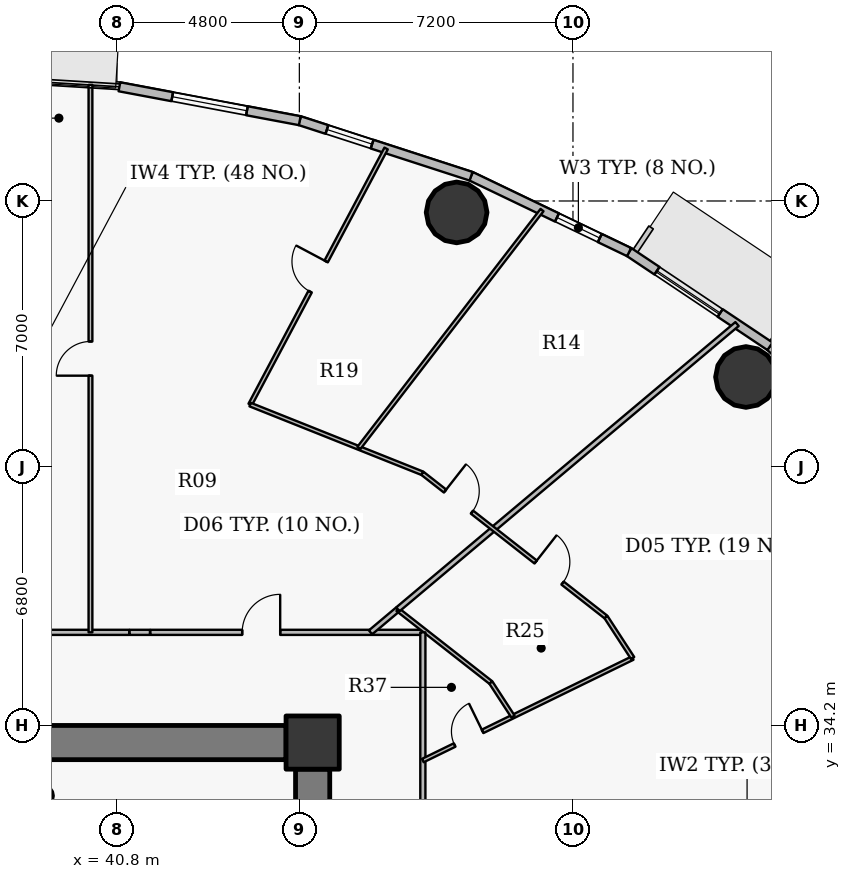
"""IFC4 building model, lengths in metres.
Left out: names, types, materials, properties, quantities, classifications, styles, units other than length and angle.
Written with IfcOpenShell. Run it as: python <this file> out.ifc"""

import sys

from ifc_helpers import new_model, si_unit, direction, frame, frame_2d, origin, origin_2d, place, context, subcontext, project, spatial, rectangle, hollow_circle, extrude, source, transform, mapped, element, fill, save


model = new_model("IFC4")
c1 = context("Model", 3, precision=1e-05, world=origin(), true_north=direction((0.0, 1.0)))
c2 = subcontext(c1, "Body", "Model", "MODEL_VIEW")
j1 = project(units=[si_unit("LENGTHUNIT", "METRE"), si_unit("PLANEANGLEUNIT", "RADIAN")], contexts=[c1])
p1 = place(None, origin())
s1 = spatial("IfcSite", under=j1, at=p1, CompositionType="ELEMENT")
p2 = place(p1, origin())
s2 = spatial("IfcBuilding", under=s1, at=p2, CompositionType="ELEMENT")
p3 = place(p2, frame((0.0, 0.0, 61.8)))
s3 = spatial("IfcBuildingStorey", under=s2, at=p3, CompositionType="ELEMENT", Elevation=61.8)
p4 = place(p3, frame((45.95, 33.75, 0.0), z_axis=(0.0, 0.0, 1.0), x_axis=(1.0, 0.0, 0.0)))
e1 = element("IfcColumn", 1, at=p4, inside=s3, PredefinedType="COLUMN", context=c2, shape_type="SweptSolid", body=[
    extrude(rectangle(XDim=1.4, YDim=1.4, at=origin_2d()), origin(), (0.0, 0.0, 1.0), 4.2),
])
p5 = place(p3, frame((38.85, 32.35, 0.0), z_axis=(0.0, 0.0, 1.0), x_axis=(1.0, 0.0, 0.0)))
e2 = element("IfcColumn", 2, at=p5, inside=s3, PredefinedType="COLUMN", context=c2, shape_type="SweptSolid", body=[
    extrude(hollow_circle(Radius=0.254, WallThickness=0.02, at=origin_2d()), origin(), (0.0, 0.0, 1.0), 4.2),
])
p6 = place(p3, frame((26.75, 33.75, 0.0), z_axis=(0.0, 0.0, 1.0), x_axis=(1.0, 0.0, 0.0)))
e3 = element("IfcWall", 3, at=p6, inside=s3, PredefinedType="SHEAR", context=c2, shape_type="SweptSolid", body=[
    extrude(rectangle(XDim=18.5, YDim=0.9, at=frame_2d((9.25, 0.0))), origin(), (0.0, 0.0, 1.0), 3.4),
])
p7 = place(p3, frame((45.95, 33.05, 0.0), z_axis=(0.0, 0.0, 1.0), x_axis=(0.0, -1.0, 0.0)))
e4 = element("IfcWall", 4, at=p7, inside=s3, PredefinedType="SHEAR", context=c2, shape_type="SweptSolid", body=[
    extrude(rectangle(XDim=12.1, YDim=0.9, at=frame_2d((6.05, 0.0))), origin(), (0.0, 0.0, 1.0), 3.4),
])
p8 = place(p7, frame((5.64, 0.0, 0.0)))
e5 = element("IfcOpeningElement", 5, at=p8, cuts=e4, PredefinedType="OPENING", context=c2, shape_type="SweptSolid", body=[
    extrude(rectangle(XDim=0.82, YDim=2.1, at=origin_2d()), frame((0.41, 0.46, 1.05), z_axis=(0.0, -1.0, 0.0), x_axis=(1.0, 0.0, 0.0)), (0.0, 0.0, 1.0), 0.92),
])
for number, where, z_axis, x_axis in (
    (6, (57.353, 43.369, 0.0), (0.0, 0.0, 1.0), (1.0, 0.0, 0.0)),
    (7, (49.738, 47.699, 0.0), (0.0, 0.0, 1.0), (1.0, 0.0, 0.0)),
):
    element("IfcColumn", number, at=place(p3, frame(where, z_axis=z_axis, x_axis=x_axis)), inside=s3, PredefinedType="COLUMN", context=c2, shape_type="SweptSolid", body=[
        extrude(hollow_circle(Radius=0.8, WallThickness=0.045, at=origin_2d()), origin(), (0.0, 0.0, 1.0), 4.2),
    ])
p9 = place(p3, frame((57.985, 44.176, 0.0), z_axis=(0.0, 0.0, 1.0), x_axis=(0.737116376281, -0.67576582321, 0.0)))
e8 = element("IfcWall", 8, at=p9, inside=s3, PredefinedType="SOLIDWALL", context=c2, shape_type="SweptSolid", body=[
    extrude(rectangle(XDim=4.294, YDim=0.24, at=frame_2d((2.147, 0.0))), origin(), (0.0, 0.0, 1.0), 3.95),
])
p10 = place(p9, frame((1.147, 0.0, 0.9)))
e9 = element("IfcOpeningElement", 9, at=p10, cuts=e8, PredefinedType="OPENING", context=c2, shape_type="SweptSolid", body=[
    extrude(rectangle(XDim=2.0, YDim=1.75, at=origin_2d()), frame((1.0, 0.13, 0.875), z_axis=(0.0, -1.0, 0.0), x_axis=(1.0, 0.0, 0.0)), (0.0, 0.0, 1.0), 0.26),
])
p11 = place(p3, frame((54.277, 46.656, 0.0), z_axis=(0.0, 0.0, 1.0), x_axis=(0.831240982525, -0.555912249343, 0.0)))
e10 = element("IfcWall", 10, at=p11, inside=s3, PredefinedType="SOLIDWALL", context=c2, shape_type="SweptSolid", body=[
    extrude(rectangle(XDim=4.46, YDim=0.24, at=frame_2d((2.23, 0.0))), origin(), (0.0, 0.0, 1.0), 3.95),
])
p12 = place(p11, frame((0.883, 0.0, 0.9)))
e11 = element("IfcOpeningElement", 11, at=p12, cuts=e10, PredefinedType="OPENING", context=c2, shape_type="SweptSolid", body=[
    extrude(rectangle(XDim=2.0, YDim=1.75, at=origin_2d()), frame((1.0, 0.13, 0.875), z_axis=(0.0, -1.0, 0.0), x_axis=(1.0, 0.0, 0.0)), (0.0, 0.0, 1.0), 0.26),
])
p13 = place(p3, frame((50.118, 48.651, 0.0), z_axis=(0.0, 0.0, 1.0), x_axis=(0.901601503137, -0.432567601123, 0.0)))
e12 = element("IfcWall", 12, at=p13, inside=s3, PredefinedType="SOLIDWALL", context=c2, shape_type="SweptSolid", body=[
    extrude(rectangle(XDim=4.613, YDim=0.24, at=frame_2d((2.306, 0.0))), origin(), (0.0, 0.0, 1.0), 3.95),
])
p14 = place(p13, frame((2.508, 0.0, 0.9)))
e13 = element("IfcOpeningElement", 13, at=p14, cuts=e12, PredefinedType="OPENING", context=c2, shape_type="SweptSolid", body=[
    extrude(rectangle(XDim=1.25, YDim=1.65, at=origin_2d()), frame((0.625, 0.13, 0.825), z_axis=(0.0, -1.0, 0.0), x_axis=(1.0, 0.0, 0.0)), (0.0, 0.0, 1.0), 0.26),
])
p15 = place(p3, frame((45.611, 50.113, 0.0), z_axis=(0.0, 0.0, 1.0), x_axis=(0.951207699013, -0.308551313946, 0.0)))
e14 = element("IfcWall", 14, at=p15, inside=s3, PredefinedType="SOLIDWALL", context=c2, shape_type="SweptSolid", body=[
    extrude(rectangle(XDim=4.739, YDim=0.24, at=frame_2d((2.369, 0.0))), origin(), (0.0, 0.0, 1.0), 3.95),
])
p16 = place(p15, frame((0.751, 0.0, 0.9)))
e15 = element("IfcOpeningElement", 15, at=p16, cuts=e14, PredefinedType="OPENING", context=c2, shape_type="SweptSolid", body=[
    extrude(rectangle(XDim=1.25, YDim=1.65, at=origin_2d()), frame((0.625, 0.13, 0.825), z_axis=(0.0, -1.0, 0.0), x_axis=(1.0, 0.0, 0.0)), (0.0, 0.0, 1.0), 0.26),
])
p17 = place(p3, frame((40.865, 51.005, 0.0), z_axis=(0.0, 0.0, 1.0), x_axis=(0.982791952378, -0.184715939598, 0.0)))
e16 = element("IfcWall", 16, at=p17, inside=s3, PredefinedType="SOLIDWALL", context=c2, shape_type="SweptSolid", body=[
    extrude(rectangle(XDim=4.828, YDim=0.24, at=frame_2d((2.414, 0.0))), origin(), (0.0, 0.0, 1.0), 3.95),
])
p18 = place(p17, frame((1.414, 0.0, 0.9)))
e17 = element("IfcOpeningElement", 17, at=p18, cuts=e16, PredefinedType="OPENING", context=c2, shape_type="SweptSolid", body=[
    extrude(rectangle(XDim=2.0, YDim=1.75, at=origin_2d()), frame((1.0, 0.13, 0.875), z_axis=(0.0, -1.0, 0.0), x_axis=(1.0, 0.0, 0.0)), (0.0, 0.0, 1.0), 0.26),
])
p19 = place(p3, frame((32.088, 36.65, 0.0), z_axis=(0.0, 0.0, 1.0), x_axis=(1.0, 0.0, 0.0)))
e18 = element("IfcWall", 18, at=p19, inside=s3, PredefinedType="PARTITIONING", context=c2, shape_type="SweptSolid", body=[
    extrude(rectangle(XDim=9.036, YDim=0.135, at=frame_2d((4.518, 0.0))), origin(), (0.0, 0.0, 1.0), 3.285),
])
p20 = place(p19, frame((3.238, 0.0, 0.0)))
e19 = element("IfcOpeningElement", 19, at=p20, cuts=e18, PredefinedType="OPENING", context=c2, shape_type="SweptSolid", body=[
    extrude(rectangle(XDim=1.0, YDim=2.15, at=origin_2d()), frame((0.5, 0.078, 1.075), z_axis=(0.0, -1.0, 0.0), x_axis=(1.0, 0.0, 0.0)), (0.0, 0.0, 1.0), 0.155),
])
p21 = place(p3, frame((40.104, 36.65, 0.0), z_axis=(0.0, 0.0, 1.0), x_axis=(0.0, 1.0, 0.0)))
e20 = element("IfcWall", 20, at=p21, inside=s3, PredefinedType="PARTITIONING", context=c2, shape_type="SweptSolid", body=[
    extrude(rectangle(XDim=14.407, YDim=0.1, at=frame_2d((7.204, 0.0))), origin(), (0.0, 0.0, 1.0), 3.335),
])
p22 = place(p21, frame((6.754, 0.0, 0.0)))
e21 = element("IfcOpeningElement", 21, at=p22, cuts=e20, PredefinedType="OPENING", context=c2, shape_type="SweptSolid", body=[
    extrude(rectangle(XDim=0.9, YDim=2.1, at=origin_2d()), frame((0.45, 0.06, 1.05), z_axis=(0.0, -1.0, 0.0), x_axis=(1.0, 0.0, 0.0)), (0.0, 0.0, 1.0), 0.12),
])
p23 = place(p3, frame((41.679, 36.65, 0.0), z_axis=(0.0, 0.0, 1.0), x_axis=(1.0, 0.0, 0.0)))
e22 = element("IfcWall", 22, at=p23, inside=s3, PredefinedType="PARTITIONING", context=c2, shape_type="SweptSolid", body=[
    extrude(rectangle(XDim=7.171, YDim=0.135, at=frame_2d((3.586, 0.0))), origin(), (0.0, 0.0, 1.0), 3.285),
])
p24 = place(p23, frame((2.417, 0.0, 0.0)))
e23 = element("IfcOpeningElement", 23, at=p24, cuts=e22, PredefinedType="OPENING", context=c2, shape_type="SweptSolid", body=[
    extrude(rectangle(XDim=1.0, YDim=2.15, at=origin_2d()), frame((0.5, 0.078, 1.075), z_axis=(0.0, -1.0, 0.0), x_axis=(1.0, 0.0, 0.0)), (0.0, 0.0, 1.0), 0.155),
])
p25 = place(p3, frame((44.306, 42.643, 0.0), z_axis=(0.0, 0.0, 1.0), x_axis=(0.468943074609, 0.883228392193, 0.0)))
e24 = element("IfcWall", 24, at=p25, inside=s3, PredefinedType="PARTITIONING", context=c2, shape_type="SweptSolid", body=[
    extrude(rectangle(XDim=7.629, YDim=0.1, at=frame_2d((3.814, 0.0))), origin(), (0.0, 0.0, 1.0), 3.335),
])
p26 = place(p25, frame((3.365, 0.0, 0.0)))
e25 = element("IfcOpeningElement", 25, at=p26, cuts=e24, PredefinedType="OPENING", context=c2, shape_type="SweptSolid", body=[
    extrude(rectangle(XDim=0.9, YDim=2.1, at=origin_2d()), frame((0.45, 0.06, 1.05), z_axis=(0.0, -1.0, 0.0), x_axis=(1.0, 0.0, 0.0)), (0.0, 0.0, 1.0), 0.12),
])
p27 = place(p3, frame((44.306, 42.643, 0.0), z_axis=(0.0, 0.0, 1.0), x_axis=(0.928800719386, -0.37057957805, 0.0)))
e26 = element("IfcWall", 26, at=p27, inside=s3, PredefinedType="PARTITIONING", context=c2, shape_type="SweptSolid", body=[
    extrude(rectangle(XDim=4.879, YDim=0.1, at=frame_2d((2.439, 0.0))), origin(), (0.0, 0.0, 1.0), 3.285),
])
p28 = place(p3, frame((47.166, 41.502, 0.0), z_axis=(0.0, 0.0, 1.0), x_axis=(0.610084092609, 0.792336670832, 0.0)))
e27 = element("IfcWall", 27, at=p28, inside=s3, PredefinedType="PARTITIONING", context=c2, shape_type="SweptSolid", body=[
    extrude(rectangle(XDim=7.899, YDim=0.1, at=frame_2d((3.95, 0.0))), origin(), (0.0, 0.0, 1.0), 3.335),
])
p29 = place(p3, frame((47.473, 36.65, 0.0), z_axis=(0.0, 0.0, 1.0), x_axis=(0.765142102307, 0.643861447268, 0.0)))
e28 = element("IfcWall", 28, at=p29, inside=s3, PredefinedType="PARTITIONING", context=c2, shape_type="SweptSolid", body=[
    extrude(rectangle(XDim=0.932, YDim=0.135, at=frame_2d((0.466, 0.0))), origin(), (0.0, 0.0, 1.0), 3.95),
])
p30 = place(p3, frame((48.186, 37.25, 0.0), z_axis=(0.0, 0.0, 1.0), x_axis=(0.787352897258, -0.61650256705, 0.0)))
e29 = element("IfcWall", 29, at=p30, inside=s3, PredefinedType="PARTITIONING", context=c2, shape_type="SweptSolid", body=[
    extrude(rectangle(XDim=3.117, YDim=0.1, at=frame_2d((1.558, 0.0))), origin(), (0.0, 0.0, 1.0), 3.285),
])
p31 = place(p3, frame((48.194, 37.256, 0.0), z_axis=(0.0, 0.0, 1.0), x_axis=(0.76528027527, 0.643697211647, 0.0)))
e30 = element("IfcWall", 30, at=p31, inside=s3, PredefinedType="PARTITIONING", context=c2, shape_type="SweptSolid", body=[
    extrude(rectangle(XDim=11.661, YDim=0.135, at=frame_2d((5.83, 0.0))), origin(), (0.0, 0.0, 1.0), 3.335),
])
p32 = place(p3, frame((48.837, 40.835, 0.0), z_axis=(0.0, 0.0, 1.0), x_axis=(0.787362261728, -0.616490607233, 0.0)))
e31 = element("IfcWall", 31, at=p32, inside=s3, PredefinedType="PARTITIONING", context=c2, shape_type="SweptSolid", body=[
    extrude(rectangle(XDim=6.137, YDim=0.1, at=frame_2d((3.068, 0.0))), origin(), (0.0, 0.0, 1.0), 3.285),
])
p33 = place(p32, frame((3.786, 0.0, 0.0)))
e32 = element("IfcOpeningElement", 32, at=p33, cuts=e31, PredefinedType="OPENING", context=c2, shape_type="SweptSolid", body=[
    extrude(rectangle(XDim=0.9, YDim=2.1, at=origin_2d()), frame((0.45, 0.06, 1.05), z_axis=(0.0, -1.0, 0.0), x_axis=(1.0, 0.0, 0.0)), (0.0, 0.0, 1.0), 0.12),
])
p34 = place(p32, frame((0.758, 0.0, 0.0)))
e33 = element("IfcOpeningElement", 33, at=p34, cuts=e31, PredefinedType="OPENING", context=c2, shape_type="SweptSolid", body=[
    extrude(rectangle(XDim=0.9, YDim=2.1, at=origin_2d()), frame((0.45, 0.06, 1.05), z_axis=(0.0, -1.0, 0.0), x_axis=(1.0, 0.0, 0.0)), (0.0, 0.0, 1.0), 0.12),
])
p35 = place(p3, frame((48.85, 24.742, 0.0), z_axis=(0.0, 0.0, 1.0), x_axis=(0.0, 1.0, 0.0)))
e34 = element("IfcWall", 34, at=p35, inside=s3, PredefinedType="PARTITIONING", context=c2, shape_type="SweptSolid", body=[
    extrude(rectangle(XDim=11.908, YDim=0.135, at=frame_2d((5.954, 0.0))), origin(), (0.0, 0.0, 1.0), 3.285),
])
p36 = place(p35, frame((6.262, 0.0, 0.0)))
e35 = element("IfcOpeningElement", 35, at=p36, cuts=e34, PredefinedType="OPENING", context=c2, shape_type="SweptSolid", body=[
    extrude(rectangle(XDim=1.0, YDim=2.15, at=origin_2d()), frame((0.5, 0.078, 1.075), z_axis=(0.0, -1.0, 0.0), x_axis=(1.0, 0.0, 0.0)), (0.0, 0.0, 1.0), 0.155),
])
p37 = place(p35, frame((2.015, 0.0, 0.0)))
e36 = element("IfcOpeningElement", 36, at=p37, cuts=e34, PredefinedType="OPENING", context=c2, shape_type="SweptSolid", body=[
    extrude(rectangle(XDim=1.0, YDim=2.15, at=origin_2d()), frame((0.5, 0.078, 1.075), z_axis=(0.0, -1.0, 0.0), x_axis=(1.0, 0.0, 0.0)), (0.0, 0.0, 1.0), 0.155),
])
p38 = place(p3, frame((48.85, 29.731, 0.0), z_axis=(0.0, 0.0, 1.0), x_axis=(0.97814985104, 0.207901103679, 0.0)))
e37 = element("IfcWall", 37, at=p38, inside=s3, PredefinedType="PARTITIONING", context=c2, shape_type="SweptSolid", body=[
    extrude(rectangle(XDim=17.444, YDim=0.135, at=frame_2d((8.722, 0.0))), origin(), (0.0, 0.0, 1.0), 3.335),
])
p39 = place(p3, frame((48.85, 33.277, 0.0), z_axis=(0.0, 0.0, 1.0), x_axis=(0.898537268474, 0.438897228476, 0.0)))
e38 = element("IfcWall", 38, at=p39, inside=s3, PredefinedType="PARTITIONING", context=c2, shape_type="SweptSolid", body=[
    extrude(rectangle(XDim=6.144, YDim=0.1, at=frame_2d((3.072, 0.0))), origin(), (0.0, 0.0, 1.0), 3.95),
])
p40 = place(p39, frame((0.93, 0.0, 0.0)))
e39 = element("IfcOpeningElement", 39, at=p40, cuts=e38, PredefinedType="OPENING", context=c2, shape_type="SweptSolid", body=[
    extrude(rectangle(XDim=0.82, YDim=2.1, at=origin_2d()), frame((0.41, 0.06, 1.05), z_axis=(0.0, -1.0, 0.0), x_axis=(1.0, 0.0, 0.0)), (0.0, 0.0, 1.0), 0.12),
])
p41 = place(p3, frame((50.64, 35.329, 0.0), z_axis=(0.0, 0.0, 1.0), x_axis=(0.545471206721, -0.838129561964, 0.0)))
e40 = element("IfcWall", 40, at=p41, inside=s3, PredefinedType="PARTITIONING", context=c2, shape_type="SweptSolid", body=[
    extrude(rectangle(XDim=1.066, YDim=0.1, at=frame_2d((0.533, 0.0))), origin(), (0.0, 0.0, 1.0), 3.95),
])
p42 = place(p3, frame((53.669, 37.052, 0.0), z_axis=(0.0, 0.0, 1.0), x_axis=(0.545381825814, -0.838187726033, 0.0)))
e41 = element("IfcWall", 41, at=p42, inside=s3, PredefinedType="PARTITIONING", context=c2, shape_type="SweptSolid", body=[
    extrude(rectangle(XDim=1.287, YDim=0.1, at=frame_2d((0.643, 0.0))), origin(), (0.0, 0.0, 1.0), 3.95),
])
p43 = place(p3, frame((41.134, 36.65, 0.0), z_axis=(0.0, 0.0, 1.0), x_axis=(1.0, 0.0, 0.0)))
e42 = element("IfcWall", 42, at=p43, inside=s3, PredefinedType="PARTITIONING", context=c2, shape_type="SweptSolid", body=[
    extrude(rectangle(XDim=0.535, YDim=0.135, at=frame_2d((0.268, 0.0))), origin(), (0.0, 0.0, 1.0), 3.95),
])
p44 = place(p3, frame((46.4, 34.2, 0.0), z_axis=(0.0, 0.0, 1.0), x_axis=(-1.0, 0.0, 0.0)))
e43 = element("IfcWall", 43, at=p44, inside=s3, PredefinedType="PARTITIONING", context=c2, shape_type="SweptSolid", body=[
    extrude(rectangle(XDim=1.14, YDim=0.135, at=frame_2d((0.57, 0.0))), origin(), (0.0, 0.0, 1.0), 3.285),
])
p45 = place(p3, frame((46.4, 33.06, 0.0), z_axis=(0.0, 0.0, 1.0), x_axis=(0.0, 1.0, 0.0)))
e44 = element("IfcWall", 44, at=p45, inside=s3, PredefinedType="PARTITIONING", context=c2, shape_type="SweptSolid", body=[
    extrude(rectangle(XDim=0.833, YDim=0.135, at=frame_2d((0.416, 0.0))), origin(), (0.0, 0.0, 1.0), 3.95),
])
m1 = source(origin(), c2, "Body", "SweptSolid", [
    extrude(rectangle(XDim=2.0, YDim=1.75, at=origin_2d()), frame((1.0, 0.03, 0.875), z_axis=(0.0, -1.0, 0.0), x_axis=(1.0, 0.0, 0.0)), (0.0, 0.0, 1.0), 0.06),
])
p46 = place(p12, origin())
e45 = element("IfcWindow", 45, at=p46, inside=s3, PartitioningType="DOUBLE_PANEL_VERTICAL", PredefinedType="WINDOW", context=c2, shape_type="MappedRepresentation", body=[
    mapped(m1, transform((0.0, 0.0, 0.0), x_axis=(1.0, 0.0, 0.0), y_axis=(0.0, 1.0, 0.0), z_axis=(0.0, 0.0, 1.0), scale=1.0)),
])
fill(e11, e45)
m2 = source(origin(), c2, "Body", "SweptSolid", [
    extrude(rectangle(XDim=1.25, YDim=1.65, at=origin_2d()), frame((0.625, 0.03, 0.825), z_axis=(0.0, -1.0, 0.0), x_axis=(1.0, 0.0, 0.0)), (0.0, 0.0, 1.0), 0.06),
])
p47 = place(p14, origin())
e46 = element("IfcWindow", 46, at=p47, inside=s3, PartitioningType="SINGLE_PANEL", PredefinedType="WINDOW", context=c2, shape_type="MappedRepresentation", body=[
    mapped(m2, transform((0.0, 0.0, 0.0), x_axis=(1.0, 0.0, 0.0), y_axis=(0.0, 1.0, 0.0), z_axis=(0.0, 0.0, 1.0), scale=1.0)),
])
fill(e13, e46)
p48 = place(p16, origin())
e47 = element("IfcWindow", 47, at=p48, inside=s3, PartitioningType="SINGLE_PANEL", PredefinedType="WINDOW", context=c2, shape_type="MappedRepresentation", body=[
    mapped(m2, transform((0.0, 0.0, 0.0), x_axis=(1.0, 0.0, 0.0), y_axis=(0.0, 1.0, 0.0), z_axis=(0.0, 0.0, 1.0), scale=1.0)),
])
fill(e15, e47)
p49 = place(p18, origin())
e48 = element("IfcWindow", 48, at=p49, inside=s3, PartitioningType="DOUBLE_PANEL_VERTICAL", PredefinedType="WINDOW", context=c2, shape_type="MappedRepresentation", body=[
    mapped(m1, transform((0.0, 0.0, 0.0), x_axis=(1.0, 0.0, 0.0), y_axis=(0.0, 1.0, 0.0), z_axis=(0.0, 0.0, 1.0), scale=1.0)),
])
fill(e17, e48)
m3 = source(origin(), c2, "Body", "SweptSolid", [
    extrude(rectangle(XDim=0.82, YDim=2.1, at=origin_2d()), frame((0.41, 0.025, 1.05), z_axis=(0.0, -1.0, 0.0), x_axis=(1.0, 0.0, 0.0)), (0.0, 0.0, 1.0), 0.05),
])
p50 = place(p40, origin())
e49 = element("IfcDoor", 49, at=p50, inside=s3, OperationType="SINGLE_SWING_RIGHT", PredefinedType="DOOR", context=c2, shape_type="MappedRepresentation", body=[
    mapped(m3, transform((0.0, 0.0, 0.0), x_axis=(1.0, 0.0, 0.0), y_axis=(0.0, 1.0, 0.0), z_axis=(0.0, 0.0, 1.0), scale=1.0)),
])
fill(e39, e49)
m4 = source(origin(), c2, "Body", "SweptSolid", [
    extrude(rectangle(XDim=0.9, YDim=2.1, at=origin_2d()), frame((0.45, 0.025, 1.05), z_axis=(0.0, -1.0, 0.0), x_axis=(1.0, 0.0, 0.0)), (0.0, 0.0, 1.0), 0.05),
])
p51 = place(p33, origin())
e50 = element("IfcDoor", 50, at=p51, inside=s3, OperationType="SINGLE_SWING_LEFT", PredefinedType="DOOR", context=c2, shape_type="MappedRepresentation", body=[
    mapped(m4, transform((0.0, 0.0, 0.0), x_axis=(1.0, 0.0, 0.0), y_axis=(0.0, 1.0, 0.0), z_axis=(0.0, 0.0, 1.0), scale=1.0)),
])
fill(e32, e50)
m5 = source(origin(), c2, "Body", "SweptSolid", [
    extrude(rectangle(XDim=1.0, YDim=2.15, at=origin_2d()), frame((0.5, 0.025, 1.075), z_axis=(0.0, -1.0, 0.0), x_axis=(1.0, 0.0, 0.0)), (0.0, 0.0, 1.0), 0.05),
])
p52 = place(p24, origin())
e51 = element("IfcDoor", 51, at=p52, inside=s3, OperationType="SINGLE_SWING_RIGHT", PredefinedType="DOOR", context=c2, shape_type="MappedRepresentation", body=[
    mapped(m5, transform((0.0, 0.0, 0.0), x_axis=(1.0, 0.0, 0.0), y_axis=(0.0, 1.0, 0.0), z_axis=(0.0, 0.0, 1.0), scale=1.0)),
])
fill(e23, e51)
p53 = place(p34, origin())
e52 = element("IfcDoor", 52, at=p53, inside=s3, OperationType="SINGLE_SWING_LEFT", PredefinedType="DOOR", context=c2, shape_type="MappedRepresentation", body=[
    mapped(m4, transform((0.0, 0.0, 0.0), x_axis=(1.0, 0.0, 0.0), y_axis=(0.0, 1.0, 0.0), z_axis=(0.0, 0.0, 1.0), scale=1.0)),
])
fill(e33, e52)
p54 = place(p26, origin())
e53 = element("IfcDoor", 53, at=p54, inside=s3, OperationType="SINGLE_SWING_RIGHT", PredefinedType="DOOR", context=c2, shape_type="MappedRepresentation", body=[
    mapped(m4, transform((0.0, 0.0, 0.0), x_axis=(1.0, 0.0, 0.0), y_axis=(0.0, 1.0, 0.0), z_axis=(0.0, 0.0, 1.0), scale=1.0)),
])
fill(e25, e53)
p55 = place(p22, origin())
e54 = element("IfcDoor", 54, at=p55, inside=s3, OperationType="SINGLE_SWING_LEFT", PredefinedType="DOOR", context=c2, shape_type="MappedRepresentation", body=[
    mapped(m4, transform((0.0, 0.0, 0.0), x_axis=(1.0, 0.0, 0.0), y_axis=(0.0, 1.0, 0.0), z_axis=(0.0, 0.0, 1.0), scale=1.0)),
])
fill(e21, e54)
save(model, sys.argv[1])
